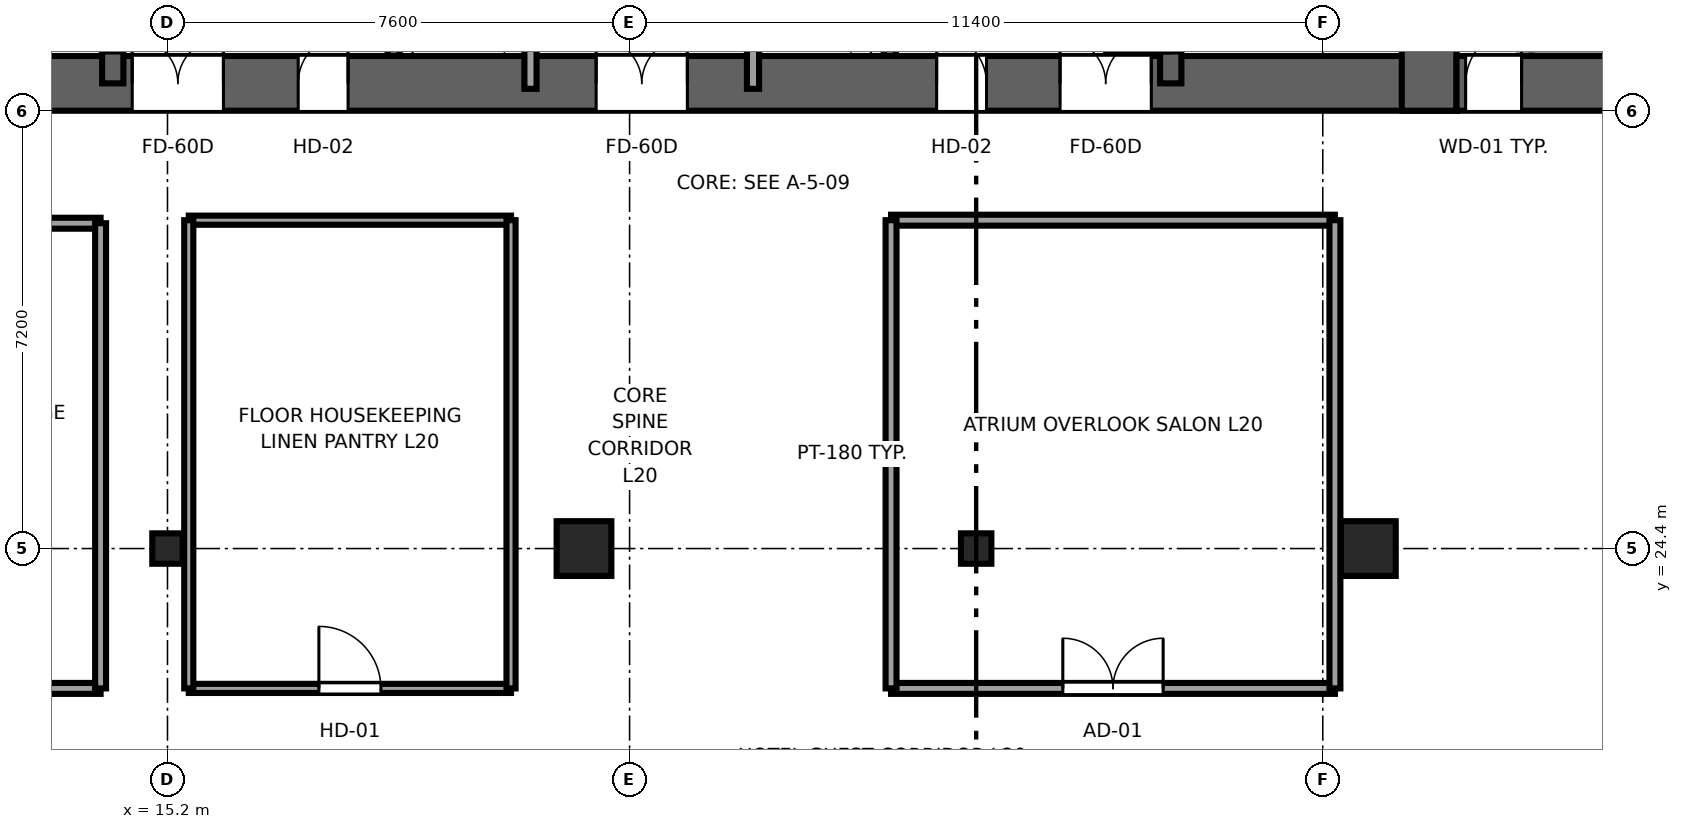
"""IFC4 building model, lengths in metres.
Left out: names, types, materials, properties, quantities, classifications, styles, units other than length and angle.
Written with IfcOpenShell. Run it as: python <this file> out.ifc"""

import sys

from ifc_helpers import new_model, si_unit, direction, frame, frame_2d, origin, origin_2d, place, context, subcontext, project, spatial, rectangle, i_section, extrude, source, transform, mapped, element, fill, save


model = new_model("IFC4")
c1 = context("Model", 3, precision=1e-05, world=origin(), true_north=direction((0.0, 1.0)))
c2 = subcontext(c1, "Body", "Model", "MODEL_VIEW")
j1 = project(units=[si_unit("LENGTHUNIT", "METRE"), si_unit("PLANEANGLEUNIT", "RADIAN")], contexts=[c1])
p1 = place(None, origin())
s1 = spatial("IfcSite", under=j1, at=p1, CompositionType="ELEMENT")
p2 = place(p1, origin())
s2 = spatial("IfcBuilding", under=s1, at=p2, CompositionType="ELEMENT")
p3 = place(p2, frame((0.0, 0.0, 81.7)))
s3 = spatial("IfcBuildingStorey", under=s2, at=p3, CompositionType="ELEMENT", Elevation=81.7)
p4 = place(p3, frame((9.6, 32.05, 0.0), z_axis=(0.0, 0.0, 1.0), x_axis=(1.0, 0.0, 0.0)))
e1 = element("IfcWall", 1, at=p4, inside=s3, PredefinedType="SHEAR", context=c2, shape_type="SweptSolid", body=[
    extrude(rectangle(XDim=26.8, YDim=0.9, at=frame_2d((13.4, 0.0))), origin(), (0.0, 0.0, 1.0), 3.55),
])
p5 = place(p4, frame((6.52, 0.0, 0.0), z_axis=(0.0, 0.0, 1.0), x_axis=(-1.0, 0.0, 0.0)))
e2 = element("IfcOpeningElement", 2, at=p5, cuts=e1, PredefinedType="OPENING", context=c2, shape_type="SweptSolid", body=[
    extrude(rectangle(XDim=1.5, YDim=2.04, at=frame_2d((0.75, 1.02))), frame((0.0, 0.46, 0.0), z_axis=(0.0, -1.0, 0.0), x_axis=(1.0, 0.0, 0.0)), (0.0, 0.0, 1.0), 0.92),
])
p6 = place(p4, frame((14.15, 0.0, 0.0), z_axis=(0.0, 0.0, 1.0), x_axis=(-1.0, 0.0, 0.0)))
e3 = element("IfcOpeningElement", 3, at=p6, cuts=e1, PredefinedType="OPENING", context=c2, shape_type="SweptSolid", body=[
    extrude(rectangle(XDim=1.5, YDim=2.04, at=frame_2d((0.75, 1.02))), frame((0.0, 0.46, 0.0), z_axis=(0.0, -1.0, 0.0), x_axis=(1.0, 0.0, 0.0)), (0.0, 0.0, 1.0), 0.92),
])
p7 = place(p4, frame((21.78, 0.0, 0.0), z_axis=(0.0, 0.0, 1.0), x_axis=(-1.0, 0.0, 0.0)))
e4 = element("IfcOpeningElement", 4, at=p7, cuts=e1, PredefinedType="OPENING", context=c2, shape_type="SweptSolid", body=[
    extrude(rectangle(XDim=1.5, YDim=2.04, at=frame_2d((0.75, 1.02))), frame((0.0, 0.46, 0.0), z_axis=(0.0, -1.0, 0.0), x_axis=(1.0, 0.0, 0.0)), (0.0, 0.0, 1.0), 0.92),
])
p8 = place(p4, frame((8.57, 0.0, 0.0), z_axis=(0.0, 0.0, 1.0), x_axis=(-1.0, 0.0, 0.0)))
e5 = element("IfcOpeningElement", 5, at=p8, cuts=e1, PredefinedType="OPENING", context=c2, shape_type="SweptSolid", body=[
    extrude(rectangle(XDim=0.82, YDim=2.01, at=frame_2d((0.41, 1.005))), frame((0.0, 0.46, 0.0), z_axis=(0.0, -1.0, 0.0), x_axis=(1.0, 0.0, 0.0)), (0.0, 0.0, 1.0), 0.92),
])
p9 = place(p4, frame((19.07, 0.0, 0.0), z_axis=(0.0, 0.0, 1.0), x_axis=(-1.0, 0.0, 0.0)))
e6 = element("IfcOpeningElement", 6, at=p9, cuts=e1, PredefinedType="OPENING", context=c2, shape_type="SweptSolid", body=[
    extrude(rectangle(XDim=0.82, YDim=2.01, at=frame_2d((0.41, 1.005))), frame((0.0, 0.46, 0.0), z_axis=(0.0, -1.0, 0.0), x_axis=(1.0, 0.0, 0.0)), (0.0, 0.0, 1.0), 0.92),
])
p10 = place(p3, frame((35.95, 31.6, 0.0), z_axis=(0.0, 0.0, 1.0), x_axis=(0.0, 1.0, 0.0)))
e7 = element("IfcWall", 7, at=p10, inside=s3, PredefinedType="SHEAR", context=c2, shape_type="SweptSolid", body=[
    extrude(rectangle(XDim=13.6, YDim=0.9, at=frame_2d((6.8, 0.0))), origin(), (0.0, 0.0, 1.0), 3.55),
])
p11 = place(p3, frame((14.3, 32.05, 0.0), z_axis=(0.0, 0.0, 1.0), x_axis=(0.0, 1.0, 0.0)))
e8 = element("IfcWall", 8, at=p11, inside=s3, PredefinedType="SHEAR", context=c2, shape_type="SweptSolid", body=[
    extrude(rectangle(XDim=12.7, YDim=0.35, at=frame_2d((6.35, 0.0))), origin(), (0.0, 0.0, 1.0), 3.55),
])
p12 = place(p11, frame((0.5, 0.0, 0.0)))
e9 = element("IfcOpeningElement", 9, at=p12, cuts=e8, PredefinedType="OPENING", context=c2, shape_type="SweptSolid", body=[
    extrude(rectangle(XDim=1.1, YDim=2.12, at=frame_2d((0.55, 1.06))), frame((0.0, 0.185, 0.0), z_axis=(0.0, -1.0, 0.0), x_axis=(1.0, 0.0, 0.0)), (0.0, 0.0, 1.0), 0.37),
])
p13 = place(p3, frame((31.7, 32.05, 0.0), z_axis=(0.0, 0.0, 1.0), x_axis=(0.0, 1.0, 0.0)))
e10 = element("IfcWall", 10, at=p13, inside=s3, PredefinedType="SHEAR", context=c2, shape_type="SweptSolid", body=[
    extrude(rectangle(XDim=12.7, YDim=0.35, at=frame_2d((6.35, 0.0))), origin(), (0.0, 0.0, 1.0), 3.55),
])
p14 = place(p13, frame((1.6, 0.0, 0.0), z_axis=(0.0, 0.0, 1.0), x_axis=(-1.0, 0.0, 0.0)))
e11 = element("IfcOpeningElement", 11, at=p14, cuts=e10, PredefinedType="OPENING", context=c2, shape_type="SweptSolid", body=[
    extrude(rectangle(XDim=1.1, YDim=2.12, at=frame_2d((0.55, 1.06))), frame((0.0, 0.185, 0.0), z_axis=(0.0, -1.0, 0.0), x_axis=(1.0, 0.0, 0.0)), (0.0, 0.0, 1.0), 0.37),
])
p15 = place(p3, frame((36.4, 32.05, 0.0), z_axis=(0.0, 0.0, 1.0), x_axis=(1.0, 0.0, 0.0)))
e12 = element("IfcWall", 12, at=p15, inside=s3, PredefinedType="SHEAR", context=c2, shape_type="SweptSolid", body=[
    extrude(rectangle(XDim=4.0, YDim=0.9, at=frame_2d((2.0, 0.0))), origin(), (0.0, 0.0, 1.0), 3.55),
])
p16 = place(p15, frame((1.07, 0.0, 0.0), z_axis=(0.0, 0.0, 1.0), x_axis=(-1.0, 0.0, 0.0)))
e13 = element("IfcOpeningElement", 13, at=p16, cuts=e12, PredefinedType="OPENING", context=c2, shape_type="SweptSolid", body=[
    extrude(rectangle(XDim=0.92, YDim=2.01, at=frame_2d((0.46, 1.005))), frame((0.0, 0.46, 0.0), z_axis=(0.0, -1.0, 0.0), x_axis=(1.0, 0.0, 0.0)), (0.0, 0.0, 1.0), 0.92),
])
m1 = source(origin(), c2, "Body", "SweptSolid", [
    extrude(i_section(OverallWidth=0.5, OverallDepth=0.5, WebThickness=0.022, FlangeThickness=0.034, at=origin_2d()), origin(), (0.0, 0.0, 1.0), 3.55),
])
p17 = place(p3, frame((15.2, 24.4, 0.0), z_axis=(0.0, 0.0, 1.0), x_axis=(1.0, 0.0, 0.0)))
e14 = element("IfcColumn", 14, at=p17, inside=s3, PredefinedType="COLUMN", context=c2, shape_type="MappedRepresentation", body=[
    mapped(m1, transform((0.0, 0.0, 0.0), x_axis=(1.0, 0.0, 0.0), y_axis=(0.0, 1.0, 0.0), z_axis=(0.0, 0.0, 1.0), scale=1.0)),
])
m2 = source(origin(), c2, "Body", "SweptSolid", [
    extrude(rectangle(XDim=0.9, YDim=0.9, at=origin_2d()), origin(), (0.0, 0.0, 1.0), 3.55),
])
for number, where, z_axis, x_axis in (
    (15, (22.05, 24.4, 0.0), (0.0, 0.0, 1.0), (1.0, 0.0, 0.0)),
    (16, (34.95, 24.4, 0.0), (0.0, 0.0, 1.0), (1.0, 0.0, 0.0)),
):
    element("IfcColumn", number, at=place(p3, frame(where, z_axis=z_axis, x_axis=x_axis)), inside=s3, PredefinedType="COLUMN", context=c2, shape_type="MappedRepresentation", body=[
        mapped(m2, transform((0.0, 0.0, 0.0), x_axis=(1.0, 0.0, 0.0), y_axis=(0.0, 1.0, 0.0), z_axis=(0.0, 0.0, 1.0), scale=1.0)),
    ])
p18 = place(p3, frame((28.5, 24.4, 0.0), z_axis=(0.0, 0.0, 1.0), x_axis=(1.0, 0.0, 0.0)))
e17 = element("IfcColumn", 17, at=p18, inside=s3, PredefinedType="COLUMN", context=c2, shape_type="MappedRepresentation", body=[
    mapped(m1, transform((0.0, 0.0, 0.0), x_axis=(1.0, 0.0, 0.0), y_axis=(0.0, 1.0, 0.0), z_axis=(0.0, 0.0, 1.0), scale=1.0)),
])
for number, where, z_axis, x_axis in (
    (18, (18.92, 32.504, 0.0), (0.0, 0.0, 1.0), (0.0, 1.0, 0.0)),
    (19, (27.08, 32.504, 0.0), (0.0, 0.0, 1.0), (0.0, 1.0, 0.0)),
):
    element("IfcWall", number, at=place(p3, frame(where, z_axis=z_axis, x_axis=x_axis)), inside=s3, PredefinedType="SOLIDWALL", context=c2, shape_type="SweptSolid", body=[
        extrude(rectangle(XDim=3.646, YDim=0.2, at=frame_2d((1.823, 0.0))), origin(), (0.0, 0.0, 1.0), 3.37),
    ])
for number, where, z_axis, x_axis in (
    (20, (21.17, 31.96, 0.0), (0.0, 0.0, 1.0), (0.0, 1.0, 0.0)),
    (21, (24.83, 31.96, 0.0), (0.0, 0.0, 1.0), (0.0, 1.0, 0.0)),
):
    element("IfcWall", number, at=place(p3, frame(where, z_axis=z_axis, x_axis=x_axis)), inside=s3, PredefinedType="SOLIDWALL", context=c2, shape_type="SweptSolid", body=[
        extrude(rectangle(XDim=12.58, YDim=0.2, at=frame_2d((6.29, 0.0))), origin(), (0.0, 0.0, 1.0), 3.37),
    ])
p19 = place(p3, frame((9.88, 22.1, 0.0), z_axis=(0.0, 0.0, 1.0), x_axis=(1.0, 0.0, 0.0)))
e22 = element("IfcWall", 22, at=p19, inside=s3, PredefinedType="PARTITIONING", context=c2, shape_type="SweptSolid", body=[
    extrude(rectangle(XDim=4.22, YDim=0.18, at=frame_2d((2.11, 0.0))), origin(), (0.0, 0.0, 1.0), 3.37),
])
p20 = place(p19, frame((1.285, 0.0, 0.0)))
e23 = element("IfcOpeningElement", 23, at=p20, cuts=e22, PredefinedType="OPENING", context=c2, shape_type="SweptSolid", body=[
    extrude(rectangle(XDim=1.65, YDim=2.15, at=frame_2d((0.825, 1.075))), frame((0.0, 0.1, 0.0), z_axis=(0.0, -1.0, 0.0), x_axis=(1.0, 0.0, 0.0)), (0.0, 0.0, 1.0), 0.2),
])
p21 = place(p3, frame((9.88, 29.75, 0.0), z_axis=(0.0, 0.0, 1.0), x_axis=(1.0, 0.0, 0.0)))
e24 = element("IfcWall", 24, at=p21, inside=s3, PredefinedType="PARTITIONING", context=c2, shape_type="SweptSolid", body=[
    extrude(rectangle(XDim=4.22, YDim=0.18, at=frame_2d((2.11, 0.0))), origin(), (0.0, 0.0, 1.0), 3.37),
])
p22 = place(p3, frame((14.1, 22.1, 0.0), z_axis=(0.0, 0.0, 1.0), x_axis=(0.0, 1.0, 0.0)))
e25 = element("IfcWall", 25, at=p22, inside=s3, PredefinedType="PARTITIONING", context=c2, shape_type="SweptSolid", body=[
    extrude(rectangle(XDim=7.65, YDim=0.18, at=frame_2d((3.825, 0.0))), origin(), (0.0, 0.0, 1.0), 3.37),
])
p23 = place(p3, frame((27.1, 22.1, 0.0), z_axis=(0.0, 0.0, 1.0), x_axis=(1.0, 0.0, 0.0)))
e26 = element("IfcWall", 26, at=p23, inside=s3, PredefinedType="PARTITIONING", context=c2, shape_type="SweptSolid", body=[
    extrude(rectangle(XDim=7.3, YDim=0.18, at=frame_2d((3.65, 0.0))), origin(), (0.0, 0.0, 1.0), 3.37),
])
p24 = place(p23, frame((2.825, 0.0, 0.0)))
e27 = element("IfcOpeningElement", 27, at=p24, cuts=e26, PredefinedType="OPENING", context=c2, shape_type="SweptSolid", body=[
    extrude(rectangle(XDim=1.65, YDim=2.15, at=frame_2d((0.825, 1.075))), frame((0.0, 0.1, 0.0), z_axis=(0.0, -1.0, 0.0), x_axis=(1.0, 0.0, 0.0)), (0.0, 0.0, 1.0), 0.2),
])
p25 = place(p3, frame((27.1, 29.8, 0.0), z_axis=(0.0, 0.0, 1.0), x_axis=(1.0, 0.0, 0.0)))
e28 = element("IfcWall", 28, at=p25, inside=s3, PredefinedType="PARTITIONING", context=c2, shape_type="SweptSolid", body=[
    extrude(rectangle(XDim=7.3, YDim=0.18, at=frame_2d((3.65, 0.0))), origin(), (0.0, 0.0, 1.0), 3.37),
])
for number, where, z_axis, x_axis in (
    (29, (27.1, 22.1, 0.0), (0.0, 0.0, 1.0), (0.0, 1.0, 0.0)),
    (30, (34.4, 22.1, 0.0), (0.0, 0.0, 1.0), (0.0, 1.0, 0.0)),
):
    element("IfcWall", number, at=place(p3, frame(where, z_axis=z_axis, x_axis=x_axis)), inside=s3, PredefinedType="PARTITIONING", context=c2, shape_type="SweptSolid", body=[
        extrude(rectangle(XDim=7.7, YDim=0.18, at=frame_2d((3.85, 0.0))), origin(), (0.0, 0.0, 1.0), 3.37),
    ])
p26 = place(p3, frame((15.55, 22.1, 0.0), z_axis=(0.0, 0.0, 1.0), x_axis=(1.0, 0.0, 0.0)))
e31 = element("IfcWall", 31, at=p26, inside=s3, PredefinedType="PARTITIONING", context=c2, shape_type="SweptSolid", body=[
    extrude(rectangle(XDim=5.3, YDim=0.15, at=frame_2d((2.65, 0.0))), origin(), (0.0, 0.0, 1.0), 3.37),
])
p27 = place(p26, frame((2.14, 0.0, 0.0)))
e32 = element("IfcOpeningElement", 32, at=p27, cuts=e31, PredefinedType="OPENING", context=c2, shape_type="SweptSolid", body=[
    extrude(rectangle(XDim=1.02, YDim=2.03, at=frame_2d((0.51, 1.015))), frame((0.0, 0.085, 0.0), z_axis=(0.0, -1.0, 0.0), x_axis=(1.0, 0.0, 0.0)), (0.0, 0.0, 1.0), 0.17),
])
p28 = place(p3, frame((15.55, 29.8, 0.0), z_axis=(0.0, 0.0, 1.0), x_axis=(1.0, 0.0, 0.0)))
e33 = element("IfcWall", 33, at=p28, inside=s3, PredefinedType="PARTITIONING", context=c2, shape_type="SweptSolid", body=[
    extrude(rectangle(XDim=5.3, YDim=0.15, at=frame_2d((2.65, 0.0))), origin(), (0.0, 0.0, 1.0), 3.37),
])
for number, where, z_axis, x_axis in (
    (34, (15.55, 22.1, 0.0), (0.0, 0.0, 1.0), (0.0, 1.0, 0.0)),
    (35, (20.85, 22.1, 0.0), (0.0, 0.0, 1.0), (0.0, 1.0, 0.0)),
):
    element("IfcWall", number, at=place(p3, frame(where, z_axis=z_axis, x_axis=x_axis)), inside=s3, PredefinedType="PARTITIONING", context=c2, shape_type="SweptSolid", body=[
        extrude(rectangle(XDim=7.7, YDim=0.15, at=frame_2d((3.85, 0.0))), origin(), (0.0, 0.0, 1.0), 3.37),
    ])
m3 = source(origin(), c2, "Body", "SweptSolid", [
    extrude(rectangle(XDim=1.1, YDim=2.12, at=frame_2d((0.55, 1.06))), frame((0.0, 0.025, 0.0), z_axis=(0.0, -1.0, 0.0), x_axis=(1.0, 0.0, 0.0)), (0.0, 0.0, 1.0), 0.05),
])
p29 = place(p12, origin())
e36 = element("IfcDoor", 36, at=p29, inside=s3, OperationType="SINGLE_SWING_RIGHT", PredefinedType="DOOR", context=c2, shape_type="MappedRepresentation", body=[
    mapped(m3, transform((0.0, 0.0, 0.0), x_axis=(1.0, 0.0, 0.0), y_axis=(0.0, 1.0, 0.0), z_axis=(0.0, 0.0, 1.0), scale=1.0)),
])
fill(e9, e36)
p30 = place(p14, origin())
e37 = element("IfcDoor", 37, at=p30, inside=s3, OperationType="SINGLE_SWING_LEFT", PredefinedType="DOOR", context=c2, shape_type="MappedRepresentation", body=[
    mapped(m3, transform((0.0, 0.0, 0.0), x_axis=(1.0, 0.0, 0.0), y_axis=(0.0, 1.0, 0.0), z_axis=(0.0, 0.0, 1.0), scale=1.0)),
])
fill(e11, e37)
m4 = source(origin(), c2, "Body", "SweptSolid", [
    extrude(rectangle(XDim=1.5, YDim=2.04, at=frame_2d((0.75, 1.02))), frame((0.0, 0.025, 0.0), z_axis=(0.0, -1.0, 0.0), x_axis=(1.0, 0.0, 0.0)), (0.0, 0.0, 1.0), 0.05),
])
p31 = place(p5, origin())
e38 = element("IfcDoor", 38, at=p31, inside=s3, OperationType="DOUBLE_DOOR_SINGLE_SWING", PredefinedType="DOOR", context=c2, shape_type="MappedRepresentation", body=[
    mapped(m4, transform((0.0, 0.0, 0.0), x_axis=(1.0, 0.0, 0.0), y_axis=(0.0, 1.0, 0.0), z_axis=(0.0, 0.0, 1.0), scale=1.0)),
])
fill(e2, e38)
p32 = place(p6, origin())
e39 = element("IfcDoor", 39, at=p32, inside=s3, OperationType="DOUBLE_DOOR_SINGLE_SWING", PredefinedType="DOOR", context=c2, shape_type="MappedRepresentation", body=[
    mapped(m4, transform((0.0, 0.0, 0.0), x_axis=(1.0, 0.0, 0.0), y_axis=(0.0, 1.0, 0.0), z_axis=(0.0, 0.0, 1.0), scale=1.0)),
])
fill(e3, e39)
p33 = place(p7, origin())
e40 = element("IfcDoor", 40, at=p33, inside=s3, OperationType="DOUBLE_DOOR_SINGLE_SWING", PredefinedType="DOOR", context=c2, shape_type="MappedRepresentation", body=[
    mapped(m4, transform((0.0, 0.0, 0.0), x_axis=(1.0, 0.0, 0.0), y_axis=(0.0, 1.0, 0.0), z_axis=(0.0, 0.0, 1.0), scale=1.0)),
])
fill(e4, e40)
m5 = source(origin(), c2, "Body", "SweptSolid", [
    extrude(rectangle(XDim=0.82, YDim=2.01, at=frame_2d((0.41, 1.005))), frame((0.0, 0.025, 0.0), z_axis=(0.0, -1.0, 0.0), x_axis=(1.0, 0.0, 0.0)), (0.0, 0.0, 1.0), 0.05),
])
p34 = place(p8, origin())
e41 = element("IfcDoor", 41, at=p34, inside=s3, OperationType="SINGLE_SWING_RIGHT", PredefinedType="DOOR", context=c2, shape_type="MappedRepresentation", body=[
    mapped(m5, transform((0.0, 0.0, 0.0), x_axis=(1.0, 0.0, 0.0), y_axis=(0.0, 1.0, 0.0), z_axis=(0.0, 0.0, 1.0), scale=1.0)),
])
fill(e5, e41)
p35 = place(p9, origin())
e42 = element("IfcDoor", 42, at=p35, inside=s3, OperationType="SINGLE_SWING_LEFT", PredefinedType="DOOR", context=c2, shape_type="MappedRepresentation", body=[
    mapped(m5, transform((0.0, 0.0, 0.0), x_axis=(1.0, 0.0, 0.0), y_axis=(0.0, 1.0, 0.0), z_axis=(0.0, 0.0, 1.0), scale=1.0)),
])
fill(e6, e42)
m6 = source(origin(), c2, "Body", "SweptSolid", [
    extrude(rectangle(XDim=0.92, YDim=2.01, at=frame_2d((0.46, 1.005))), frame((0.0, 0.025, 0.0), z_axis=(0.0, -1.0, 0.0), x_axis=(1.0, 0.0, 0.0)), (0.0, 0.0, 1.0), 0.05),
])
p36 = place(p16, origin())
e43 = element("IfcDoor", 43, at=p36, inside=s3, OperationType="SINGLE_SWING_RIGHT", PredefinedType="DOOR", context=c2, shape_type="MappedRepresentation", body=[
    mapped(m6, transform((0.0, 0.0, 0.0), x_axis=(1.0, 0.0, 0.0), y_axis=(0.0, 1.0, 0.0), z_axis=(0.0, 0.0, 1.0), scale=1.0)),
])
fill(e13, e43)
m7 = source(origin(), c2, "Body", "SweptSolid", [
    extrude(rectangle(XDim=1.65, YDim=2.15, at=frame_2d((0.825, 1.075))), frame((0.0, 0.025, 0.0), z_axis=(0.0, -1.0, 0.0), x_axis=(1.0, 0.0, 0.0)), (0.0, 0.0, 1.0), 0.05),
])
p37 = place(p24, origin())
e44 = element("IfcDoor", 44, at=p37, inside=s3, OperationType="DOUBLE_DOOR_SINGLE_SWING", PredefinedType="DOOR", context=c2, shape_type="MappedRepresentation", body=[
    mapped(m7, transform((0.0, 0.0, 0.0), x_axis=(1.0, 0.0, 0.0), y_axis=(0.0, 1.0, 0.0), z_axis=(0.0, 0.0, 1.0), scale=1.0)),
])
fill(e27, e44)
m8 = source(origin(), c2, "Body", "SweptSolid", [
    extrude(rectangle(XDim=1.02, YDim=2.03, at=frame_2d((0.51, 1.015))), frame((0.0, 0.025, 0.0), z_axis=(0.0, -1.0, 0.0), x_axis=(1.0, 0.0, 0.0)), (0.0, 0.0, 1.0), 0.05),
])
p38 = place(p27, origin())
e45 = element("IfcDoor", 45, at=p38, inside=s3, OperationType="SINGLE_SWING_LEFT", PredefinedType="DOOR", context=c2, shape_type="MappedRepresentation", body=[
    mapped(m8, transform((0.0, 0.0, 0.0), x_axis=(1.0, 0.0, 0.0), y_axis=(0.0, 1.0, 0.0), z_axis=(0.0, 0.0, 1.0), scale=1.0)),
])
fill(e32, e45)
save(model, sys.argv[1])
